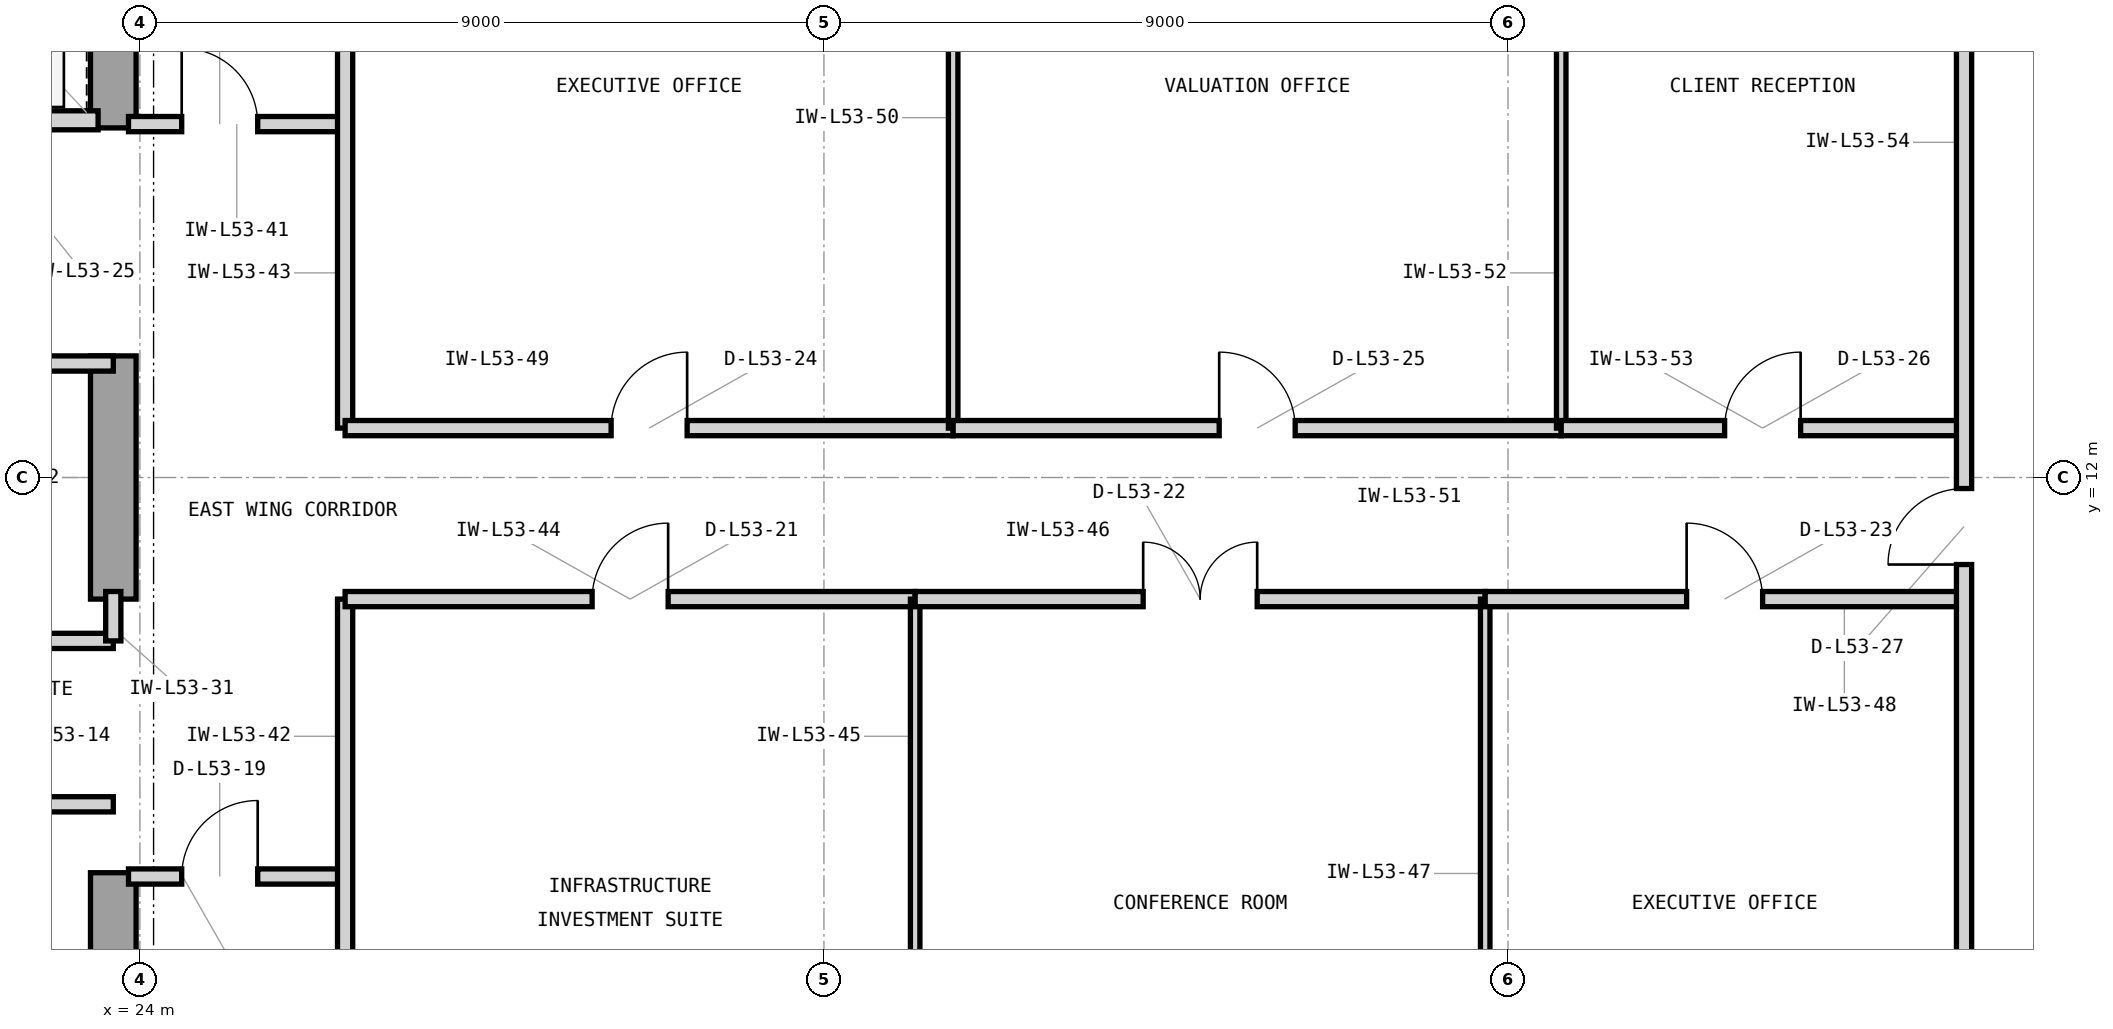
"""IFC4 building model, lengths in metres.
Left out: names, types, materials, properties, quantities, classifications, styles, units other than length and angle.
Written with IfcOpenShell. Run it as: python <this file> out.ifc"""

import sys

from ifc_helpers import new_model, si_unit, direction, frame, frame_2d, origin, place, context, subcontext, project, spatial, rectangle, extrude, element, fill, save


model = new_model("IFC4")
c1 = context("Model", 3, precision=1e-05, world=origin(), true_north=direction((0.0, 1.0)))
c2 = subcontext(c1, "Body", "Model", "MODEL_VIEW")
j1 = project(units=[si_unit("LENGTHUNIT", "METRE"), si_unit("PLANEANGLEUNIT", "RADIAN")], contexts=[c1])
p1 = place(None, origin())
s1 = spatial("IfcSite", under=j1, at=p1, CompositionType="ELEMENT")
p2 = place(p1, origin())
s2 = spatial("IfcBuilding", under=s1, at=p2, CompositionType="ELEMENT")
p3 = place(p2, frame((0.0, 0.0, 219.0)))
s3 = spatial("IfcBuildingStorey", under=s2, at=p3, CompositionType="ELEMENT", Elevation=219.0)
p4 = place(p3, frame((23.65, 3.65, 0.0), z_axis=(0.0, 0.0, 1.0), x_axis=(0.0, 1.0, 0.0)))
e1 = element("IfcWall", 1, at=p4, inside=s3, PredefinedType="SHEAR", context=c2, shape_type="SweptSolid", body=[
    extrude(rectangle(XDim=3.15, YDim=0.6, at=frame_2d((1.575, 0.0))), origin(), (0.0, 0.0, 1.0), 3.9),
])
p5 = place(p3, frame((23.65, 10.4, 0.0), z_axis=(0.0, 0.0, 1.0), x_axis=(0.0, 1.0, 0.0)))
e2 = element("IfcWall", 2, at=p5, inside=s3, PredefinedType="SHEAR", context=c2, shape_type="SweptSolid", body=[
    extrude(rectangle(XDim=3.2, YDim=0.6, at=frame_2d((1.6, 0.0))), origin(), (0.0, 0.0, 1.0), 3.9),
])
p6 = place(p3, frame((23.65, 16.6, 0.0), z_axis=(0.0, 0.0, 1.0), x_axis=(0.0, 1.0, 0.0)))
e3 = element("IfcWall", 3, at=p6, inside=s3, PredefinedType="SHEAR", context=c2, shape_type="SweptSolid", body=[
    extrude(rectangle(XDim=4.05, YDim=0.6, at=frame_2d((2.025, 0.0))), origin(), (0.0, 0.0, 1.0), 3.9),
])
p7 = place(p3, frame((21.05, 16.7, 0.0), z_axis=(0.0, 0.0, 1.0), x_axis=(1.0, 0.0, 0.0)))
e4 = element("IfcWall", 4, at=p7, inside=s3, PredefinedType="PARTITIONING", context=c2, shape_type="SweptSolid", body=[
    extrude(rectangle(XDim=2.4, YDim=0.25, at=frame_2d((1.2, 0.0))), origin(), (0.0, 0.0, 1.0), 3.283),
])
p8 = place(p7, frame((0.52, 0.0, 0.0)))
e5 = element("IfcOpeningElement", 5, at=p8, cuts=e4, PredefinedType="OPENING", context=c2, shape_type="SweptSolid", body=[
    extrude(rectangle(XDim=1.15, YDim=2.25, at=frame_2d((0.575, 1.125))), frame((0.0, 0.135, 0.0), z_axis=(0.0, -1.0, 0.0), x_axis=(1.0, 0.0, 0.0)), (0.0, 0.0, 1.0), 0.27),
])
p9 = place(p3, frame((19.15, 7.7, 0.0), z_axis=(0.0, 0.0, 1.0), x_axis=(1.0, 0.0, 0.0)))
e6 = element("IfcWall", 6, at=p9, inside=s3, PredefinedType="PARTITIONING", context=c2, shape_type="SweptSolid", body=[
    extrude(rectangle(XDim=4.5, YDim=0.2, at=frame_2d((2.25, 0.0))), origin(), (0.0, 0.0, 1.0), 3.64),
])
p10 = place(p9, frame((1.75, 0.0, 0.0)))
e7 = element("IfcOpeningElement", 7, at=p10, cuts=e6, PredefinedType="OPENING", context=c2, shape_type="SweptSolid", body=[
    extrude(rectangle(XDim=1.0, YDim=2.15, at=frame_2d((0.5, 1.075))), frame((0.0, 0.11, 0.0), z_axis=(0.0, -1.0, 0.0), x_axis=(1.0, 0.0, 0.0)), (0.0, 0.0, 1.0), 0.22),
])
p11 = place(p3, frame((14.825, 9.85, 0.0), z_axis=(0.0, 0.0, 1.0), x_axis=(1.0, 0.0, 0.0)))
e8 = element("IfcWall", 8, at=p11, inside=s3, PredefinedType="PARTITIONING", context=c2, shape_type="SweptSolid", body=[
    extrude(rectangle(XDim=8.825, YDim=0.2, at=frame_2d((4.413, 0.0))), origin(), (0.0, 0.0, 1.0), 3.64),
])
p12 = place(p3, frame((23.65, 9.85, 0.0), z_axis=(0.0, 0.0, 1.0), x_axis=(0.0, 1.0, 0.0)))
e9 = element("IfcWall", 9, at=p12, inside=s3, PredefinedType="PARTITIONING", context=c2, shape_type="SweptSolid", body=[
    extrude(rectangle(XDim=0.65, YDim=0.2, at=frame_2d((0.325, 0.0))), origin(), (0.0, 0.0, 1.0), 3.64),
])
p13 = place(p3, frame((19.85, 13.5, 0.0), z_axis=(0.0, 0.0, 1.0), x_axis=(1.0, 0.0, 0.0)))
e10 = element("IfcWall", 10, at=p13, inside=s3, PredefinedType="PARTITIONING", context=c2, shape_type="SweptSolid", body=[
    extrude(rectangle(XDim=3.8, YDim=0.2, at=frame_2d((1.9, 0.0))), origin(), (0.0, 0.0, 1.0), 3.283),
])
p14 = place(p13, frame((1.425, 0.0, 0.0)))
e11 = element("IfcOpeningElement", 11, at=p14, cuts=e10, PredefinedType="OPENING", context=c2, shape_type="SweptSolid", body=[
    extrude(rectangle(XDim=0.95, YDim=2.1, at=frame_2d((0.475, 1.05))), frame((0.0, 0.11, 0.0), z_axis=(0.0, -1.0, 0.0), x_axis=(1.0, 0.0, 0.0)), (0.0, 0.0, 1.0), 0.22),
])
p15 = place(p3, frame((23.85, 6.75, 0.0), z_axis=(0.0, 0.0, 1.0), x_axis=(1.0, 0.0, 0.0)))
e12 = element("IfcWall", 12, at=p15, inside=s3, PredefinedType="PARTITIONING", context=c2, shape_type="SweptSolid", body=[
    extrude(rectangle(XDim=2.85, YDim=0.2, at=frame_2d((1.425, 0.0))), origin(), (0.0, 0.0, 1.0), 3.64),
])
p16 = place(p15, frame((0.7, 0.0, 0.0)))
e13 = element("IfcOpeningElement", 13, at=p16, cuts=e12, PredefinedType="OPENING", context=c2, shape_type="SweptSolid", body=[
    extrude(rectangle(XDim=1.0, YDim=2.15, at=frame_2d((0.5, 1.075))), frame((0.0, 0.11, 0.0), z_axis=(0.0, -1.0, 0.0), x_axis=(1.0, 0.0, 0.0)), (0.0, 0.0, 1.0), 0.22),
])
p17 = place(p3, frame((23.85, 16.65, 0.0), z_axis=(0.0, 0.0, 1.0), x_axis=(1.0, 0.0, 0.0)))
e14 = element("IfcWall", 14, at=p17, inside=s3, PredefinedType="PARTITIONING", context=c2, shape_type="SweptSolid", body=[
    extrude(rectangle(XDim=2.85, YDim=0.2, at=frame_2d((1.425, 0.0))), origin(), (0.0, 0.0, 1.0), 3.64),
])
p18 = place(p17, frame((0.7, 0.0, 0.0)))
e15 = element("IfcOpeningElement", 15, at=p18, cuts=e14, PredefinedType="OPENING", context=c2, shape_type="SweptSolid", body=[
    extrude(rectangle(XDim=1.0, YDim=2.15, at=frame_2d((0.5, 1.075))), frame((0.0, 0.11, 0.0), z_axis=(0.0, -1.0, 0.0), x_axis=(1.0, 0.0, 0.0)), (0.0, 0.0, 1.0), 0.22),
])
p19 = place(p3, frame((26.7, 3.18, 0.0), z_axis=(0.0, 0.0, 1.0), x_axis=(0.0, 1.0, 0.0)))
e16 = element("IfcWall", 16, at=p19, inside=s3, PredefinedType="PARTITIONING", context=c2, shape_type="SweptSolid", body=[
    extrude(rectangle(XDim=7.22, YDim=0.2, at=frame_2d((3.61, 0.0))), origin(), (0.0, 0.0, 1.0), 3.64),
])
p20 = place(p3, frame((26.7, 12.65, 0.0), z_axis=(0.0, 0.0, 1.0), x_axis=(0.0, 1.0, 0.0)))
e17 = element("IfcWall", 17, at=p20, inside=s3, PredefinedType="PARTITIONING", context=c2, shape_type="SweptSolid", body=[
    extrude(rectangle(XDim=8.17, YDim=0.2, at=frame_2d((4.085, 0.0))), origin(), (0.0, 0.0, 1.0), 3.64),
])
p21 = place(p3, frame((26.7, 10.4, 0.0), z_axis=(0.0, 0.0, 1.0), x_axis=(1.0, 0.0, 0.0)))
e18 = element("IfcWall", 18, at=p21, inside=s3, PredefinedType="PARTITIONING", context=c2, shape_type="SweptSolid", body=[
    extrude(rectangle(XDim=7.5, YDim=0.2, at=frame_2d((3.75, 0.0))), origin(), (0.0, 0.0, 1.0), 3.64),
])
p22 = place(p21, frame((3.25, 0.0, 0.0)))
e19 = element("IfcOpeningElement", 19, at=p22, cuts=e18, PredefinedType="OPENING", context=c2, shape_type="SweptSolid", body=[
    extrude(rectangle(XDim=1.0, YDim=2.15, at=frame_2d((0.5, 1.075))), frame((0.0, 0.11, 0.0), z_axis=(0.0, -1.0, 0.0), x_axis=(1.0, 0.0, 0.0)), (0.0, 0.0, 1.0), 0.22),
])
p23 = place(p3, frame((34.2, 3.18, 0.0), z_axis=(0.0, 0.0, 1.0), x_axis=(0.0, 1.0, 0.0)))
e20 = element("IfcWall", 20, at=p23, inside=s3, PredefinedType="PARTITIONING", context=c2, shape_type="SweptSolid", body=[
    extrude(rectangle(XDim=7.22, YDim=0.125, at=frame_2d((3.61, 0.0))), origin(), (0.0, 0.0, 1.0), 3.64),
])
p24 = place(p3, frame((34.2, 10.4, 0.0), z_axis=(0.0, 0.0, 1.0), x_axis=(1.0, 0.0, 0.0)))
e21 = element("IfcWall", 21, at=p24, inside=s3, PredefinedType="PARTITIONING", context=c2, shape_type="SweptSolid", body=[
    extrude(rectangle(XDim=7.5, YDim=0.2, at=frame_2d((3.75, 0.0))), origin(), (0.0, 0.0, 1.0), 3.64),
])
p25 = place(p24, frame((3.0, 0.0, 0.0)))
e22 = element("IfcOpeningElement", 22, at=p25, cuts=e21, PredefinedType="OPENING", context=c2, shape_type="SweptSolid", body=[
    extrude(rectangle(XDim=1.5, YDim=2.3, at=frame_2d((0.75, 1.15))), frame((0.0, 0.11, 0.0), z_axis=(0.0, -1.0, 0.0), x_axis=(1.0, 0.0, 0.0)), (0.0, 0.0, 1.0), 0.22),
])
p26 = place(p3, frame((41.7, 3.18, 0.0), z_axis=(0.0, 0.0, 1.0), x_axis=(0.0, 1.0, 0.0)))
e23 = element("IfcWall", 23, at=p26, inside=s3, PredefinedType="PARTITIONING", context=c2, shape_type="SweptSolid", body=[
    extrude(rectangle(XDim=7.22, YDim=0.125, at=frame_2d((3.61, 0.0))), origin(), (0.0, 0.0, 1.0), 3.64),
])
p27 = place(p3, frame((41.7, 10.4, 0.0), z_axis=(0.0, 0.0, 1.0), x_axis=(1.0, 0.0, 0.0)))
e24 = element("IfcWall", 24, at=p27, inside=s3, PredefinedType="PARTITIONING", context=c2, shape_type="SweptSolid", body=[
    extrude(rectangle(XDim=6.3, YDim=0.2, at=frame_2d((3.15, 0.0))), origin(), (0.0, 0.0, 1.0), 3.64),
])
p28 = place(p27, frame((2.65, 0.0, 0.0)))
e25 = element("IfcOpeningElement", 25, at=p28, cuts=e24, PredefinedType="OPENING", context=c2, shape_type="SweptSolid", body=[
    extrude(rectangle(XDim=1.0, YDim=2.15, at=frame_2d((0.5, 1.075))), frame((0.0, 0.11, 0.0), z_axis=(0.0, -1.0, 0.0), x_axis=(1.0, 0.0, 0.0)), (0.0, 0.0, 1.0), 0.22),
])
p29 = place(p3, frame((26.7, 12.65, 0.0), z_axis=(0.0, 0.0, 1.0), x_axis=(1.0, 0.0, 0.0)))
e26 = element("IfcWall", 26, at=p29, inside=s3, PredefinedType="PARTITIONING", context=c2, shape_type="SweptSolid", body=[
    extrude(rectangle(XDim=8.0, YDim=0.2, at=frame_2d((4.0, 0.0))), origin(), (0.0, 0.0, 1.0), 3.64),
])
p30 = place(p29, frame((3.5, 0.0, 0.0)))
e27 = element("IfcOpeningElement", 27, at=p30, cuts=e26, PredefinedType="OPENING", context=c2, shape_type="SweptSolid", body=[
    extrude(rectangle(XDim=1.0, YDim=2.15, at=frame_2d((0.5, 1.075))), frame((0.0, 0.11, 0.0), z_axis=(0.0, -1.0, 0.0), x_axis=(1.0, 0.0, 0.0)), (0.0, 0.0, 1.0), 0.22),
])
p31 = place(p3, frame((34.7, 12.65, 0.0), z_axis=(0.0, 0.0, 1.0), x_axis=(0.0, 1.0, 0.0)))
e28 = element("IfcWall", 28, at=p31, inside=s3, PredefinedType="PARTITIONING", context=c2, shape_type="SweptSolid", body=[
    extrude(rectangle(XDim=8.17, YDim=0.125, at=frame_2d((4.085, 0.0))), origin(), (0.0, 0.0, 1.0), 3.64),
])
p32 = place(p3, frame((34.7, 12.65, 0.0), z_axis=(0.0, 0.0, 1.0), x_axis=(1.0, 0.0, 0.0)))
e29 = element("IfcWall", 29, at=p32, inside=s3, PredefinedType="PARTITIONING", context=c2, shape_type="SweptSolid", body=[
    extrude(rectangle(XDim=8.0, YDim=0.2, at=frame_2d((4.0, 0.0))), origin(), (0.0, 0.0, 1.0), 3.64),
])
p33 = place(p32, frame((3.5, 0.0, 0.0)))
e30 = element("IfcOpeningElement", 30, at=p33, cuts=e29, PredefinedType="OPENING", context=c2, shape_type="SweptSolid", body=[
    extrude(rectangle(XDim=1.0, YDim=2.15, at=frame_2d((0.5, 1.075))), frame((0.0, 0.11, 0.0), z_axis=(0.0, -1.0, 0.0), x_axis=(1.0, 0.0, 0.0)), (0.0, 0.0, 1.0), 0.22),
])
p34 = place(p3, frame((42.7, 12.65, 0.0), z_axis=(0.0, 0.0, 1.0), x_axis=(0.0, 1.0, 0.0)))
e31 = element("IfcWall", 31, at=p34, inside=s3, PredefinedType="PARTITIONING", context=c2, shape_type="SweptSolid", body=[
    extrude(rectangle(XDim=8.17, YDim=0.125, at=frame_2d((4.085, 0.0))), origin(), (0.0, 0.0, 1.0), 3.64),
])
p35 = place(p3, frame((42.7, 12.65, 0.0), z_axis=(0.0, 0.0, 1.0), x_axis=(1.0, 0.0, 0.0)))
e32 = element("IfcWall", 32, at=p35, inside=s3, PredefinedType="PARTITIONING", context=c2, shape_type="SweptSolid", body=[
    extrude(rectangle(XDim=5.3, YDim=0.2, at=frame_2d((2.65, 0.0))), origin(), (0.0, 0.0, 1.0), 3.64),
])
p36 = place(p35, frame((2.15, 0.0, 0.0)))
e33 = element("IfcOpeningElement", 33, at=p36, cuts=e32, PredefinedType="OPENING", context=c2, shape_type="SweptSolid", body=[
    extrude(rectangle(XDim=1.0, YDim=2.15, at=frame_2d((0.5, 1.075))), frame((0.0, 0.11, 0.0), z_axis=(0.0, -1.0, 0.0), x_axis=(1.0, 0.0, 0.0)), (0.0, 0.0, 1.0), 0.22),
])
p37 = place(p3, frame((48.0, 3.18, 0.0), z_axis=(0.0, 0.0, 1.0), x_axis=(0.0, 1.0, 0.0)))
e34 = element("IfcWall", 34, at=p37, inside=s3, PredefinedType="PARTITIONING", context=c2, shape_type="SweptSolid", body=[
    extrude(rectangle(XDim=17.64, YDim=0.2, at=frame_2d((8.82, 0.0))), origin(), (0.0, 0.0, 1.0), 3.073),
])
p38 = place(p37, frame((7.675, 0.0, 0.0)))
e35 = element("IfcOpeningElement", 35, at=p38, cuts=e34, PredefinedType="OPENING", context=c2, shape_type="SweptSolid", body=[
    extrude(rectangle(XDim=1.0, YDim=2.15, at=frame_2d((0.5, 1.075))), frame((0.0, 0.11, 0.0), z_axis=(0.0, -1.0, 0.0), x_axis=(1.0, 0.0, 0.0)), (0.0, 0.0, 1.0), 0.22),
])
p39 = place(p16, origin())
e36 = element("IfcDoor", 36, at=p39, inside=s3, OperationType="SINGLE_SWING_RIGHT", PredefinedType="DOOR", context=c2, shape_type="SweptSolid", body=[
    extrude(rectangle(XDim=1.0, YDim=2.15, at=frame_2d((0.5, 1.075))), frame((0.0, 0.025, 0.0), z_axis=(0.0, -1.0, 0.0), x_axis=(1.0, 0.0, 0.0)), (0.0, 0.0, 1.0), 0.05),
])
fill(e13, e36)
p40 = place(p18, origin())
e37 = element("IfcDoor", 37, at=p40, inside=s3, OperationType="SINGLE_SWING_LEFT", PredefinedType="DOOR", context=c2, shape_type="SweptSolid", body=[
    extrude(rectangle(XDim=1.0, YDim=2.15, at=frame_2d((0.5, 1.075))), frame((0.0, 0.025, 0.0), z_axis=(0.0, -1.0, 0.0), x_axis=(1.0, 0.0, 0.0)), (0.0, 0.0, 1.0), 0.05),
])
fill(e15, e37)
p41 = place(p22, origin())
e38 = element("IfcDoor", 38, at=p41, inside=s3, OperationType="SINGLE_SWING_RIGHT", PredefinedType="DOOR", context=c2, shape_type="SweptSolid", body=[
    extrude(rectangle(XDim=1.0, YDim=2.15, at=frame_2d((0.5, 1.075))), frame((0.0, 0.025, 0.0), z_axis=(0.0, -1.0, 0.0), x_axis=(1.0, 0.0, 0.0)), (0.0, 0.0, 1.0), 0.05),
])
fill(e19, e38)
p42 = place(p25, origin())
e39 = element("IfcDoor", 39, at=p42, inside=s3, OperationType="DOUBLE_DOOR_SINGLE_SWING", PredefinedType="DOOR", context=c2, shape_type="SweptSolid", body=[
    extrude(rectangle(XDim=1.5, YDim=2.3, at=frame_2d((0.75, 1.15))), frame((0.0, 0.025, 0.0), z_axis=(0.0, -1.0, 0.0), x_axis=(1.0, 0.0, 0.0)), (0.0, 0.0, 1.0), 0.05),
])
fill(e22, e39)
p43 = place(p28, origin())
e40 = element("IfcDoor", 40, at=p43, inside=s3, OperationType="SINGLE_SWING_LEFT", PredefinedType="DOOR", context=c2, shape_type="SweptSolid", body=[
    extrude(rectangle(XDim=1.0, YDim=2.15, at=frame_2d((0.5, 1.075))), frame((0.0, 0.025, 0.0), z_axis=(0.0, -1.0, 0.0), x_axis=(1.0, 0.0, 0.0)), (0.0, 0.0, 1.0), 0.05),
])
fill(e25, e40)
p44 = place(p30, origin())
e41 = element("IfcDoor", 41, at=p44, inside=s3, OperationType="SINGLE_SWING_RIGHT", PredefinedType="DOOR", context=c2, shape_type="SweptSolid", body=[
    extrude(rectangle(XDim=1.0, YDim=2.15, at=frame_2d((0.5, 1.075))), frame((0.0, 0.025, 0.0), z_axis=(0.0, -1.0, 0.0), x_axis=(1.0, 0.0, 0.0)), (0.0, 0.0, 1.0), 0.05),
])
fill(e27, e41)
p45 = place(p33, origin())
e42 = element("IfcDoor", 42, at=p45, inside=s3, OperationType="SINGLE_SWING_LEFT", PredefinedType="DOOR", context=c2, shape_type="SweptSolid", body=[
    extrude(rectangle(XDim=1.0, YDim=2.15, at=frame_2d((0.5, 1.075))), frame((0.0, 0.025, 0.0), z_axis=(0.0, -1.0, 0.0), x_axis=(1.0, 0.0, 0.0)), (0.0, 0.0, 1.0), 0.05),
])
fill(e30, e42)
p46 = place(p36, origin())
e43 = element("IfcDoor", 43, at=p46, inside=s3, OperationType="SINGLE_SWING_RIGHT", PredefinedType="DOOR", context=c2, shape_type="SweptSolid", body=[
    extrude(rectangle(XDim=1.0, YDim=2.15, at=frame_2d((0.5, 1.075))), frame((0.0, 0.025, 0.0), z_axis=(0.0, -1.0, 0.0), x_axis=(1.0, 0.0, 0.0)), (0.0, 0.0, 1.0), 0.05),
])
fill(e33, e43)
p47 = place(p38, origin())
e44 = element("IfcDoor", 44, at=p47, inside=s3, OperationType="SINGLE_SWING_LEFT", PredefinedType="DOOR", context=c2, shape_type="SweptSolid", body=[
    extrude(rectangle(XDim=1.0, YDim=2.15, at=frame_2d((0.5, 1.075))), frame((0.0, 0.025, 0.0), z_axis=(0.0, -1.0, 0.0), x_axis=(1.0, 0.0, 0.0)), (0.0, 0.0, 1.0), 0.05),
])
fill(e35, e44)
save(model, sys.argv[1])
